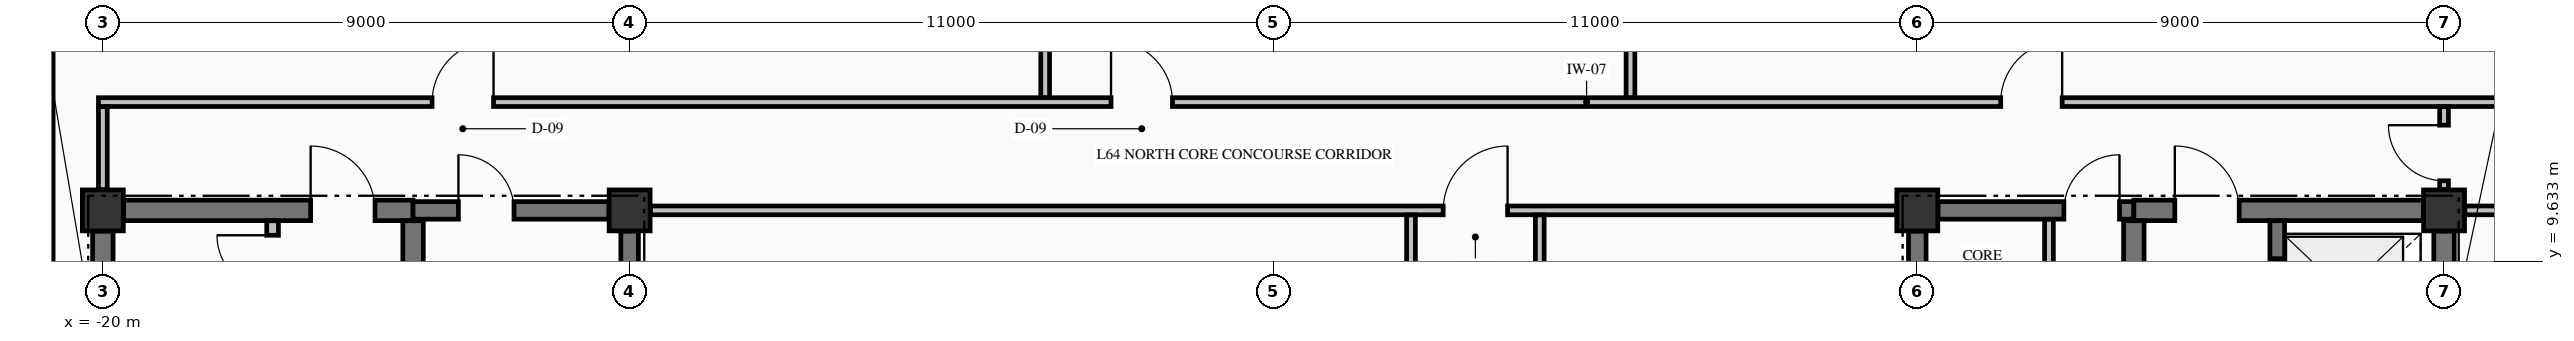
"""IFC4 building model, lengths in metres.
Left out: names, types, materials, properties, quantities, classifications, styles, units other than length and angle.
Written with IfcOpenShell. Run it as: python <this file> out.ifc"""

import sys

from ifc_helpers import new_model, si_unit, direction, frame, frame_2d, origin, origin_2d, place, context, subcontext, project, spatial, rectangle, extrude, element, fill, save


model = new_model("IFC4")
c1 = context("Model", 3, precision=1e-05, world=origin(), true_north=direction((0.0, 1.0)))
c2 = subcontext(c1, "Body", "Model", "MODEL_VIEW")
j1 = project(units=[si_unit("LENGTHUNIT", "METRE"), si_unit("PLANEANGLEUNIT", "RADIAN")], contexts=[c1])
p1 = place(None, origin())
s1 = spatial("IfcSite", under=j1, at=p1, CompositionType="ELEMENT")
p2 = place(p1, origin())
s2 = spatial("IfcBuilding", under=s1, at=p2, CompositionType="ELEMENT")
p3 = place(p2, frame((0.0, 0.0, 242.97)))
s3 = spatial("IfcBuildingStorey", under=s2, at=p3, CompositionType="ELEMENT", Elevation=242.97)
for number, where, z_axis, x_axis in (
    (1, (-20.0, 10.5, -0.25), (0.0, 0.0, 1.0), (1.0, 0.0, 0.0)),
    (2, (-11.0, 10.5, -0.25), (0.0, 0.0, 1.0), (1.0, 0.0, 0.0)),
    (3, (11.0, 10.5, -0.25), (0.0, 0.0, 1.0), (1.0, 0.0, 0.0)),
    (4, (20.0, 10.5, -0.25), (0.0, 0.0, 1.0), (1.0, 0.0, 0.0)),
):
    element("IfcColumn", number, at=place(p3, frame(where, z_axis=z_axis, x_axis=x_axis)), inside=s3, PredefinedType="COLUMN", context=c2, shape_type="SweptSolid", body=[
        extrude(rectangle(XDim=0.7, YDim=0.7, at=origin_2d()), origin(), (0.0, 0.0, 1.0), 3.23),
    ])
p4 = place(p3, frame((-21.0, 17.545, 0.0), z_axis=(0.0, 0.0, 1.0), x_axis=(0.0, -1.0, 0.0)))
e5 = element("IfcWall", 5, at=p4, inside=s3, PredefinedType="STANDARD", context=c2, shape_type="SweptSolid", body=[
    extrude(rectangle(XDim=8.09, YDim=0.3, at=frame_2d((4.045, 0.0))), origin(), (0.0, 0.0, 1.0), 2.372),
])
p5 = place(p3, frame((-19.646, 10.5, 0.0), z_axis=(0.0, 0.0, 1.0), x_axis=(1.0, 0.0, 0.0)))
e6 = element("IfcWall", 6, at=p5, inside=s3, PredefinedType="SHEAR", context=c2, shape_type="SweptSolid", body=[
    extrude(rectangle(XDim=4.946, YDim=0.35, at=frame_2d((2.473, 0.0))), origin(), (0.0, 0.0, 1.0), 2.98),
])
p6 = place(p5, frame((3.196, 0.0, 0.0)))
e7 = element("IfcOpeningElement", 7, at=p6, cuts=e6, PredefinedType="OPENING", context=c2, shape_type="SweptSolid", body=[
    extrude(rectangle(XDim=1.1, YDim=2.15, at=frame_2d((0.55, 1.075))), frame((0.0, 0.185, 0.0), z_axis=(0.0, -1.0, 0.0), x_axis=(1.0, 0.0, 0.0)), (0.0, 0.0, 1.0), 0.37),
])
p7 = place(p3, frame((-14.7, 10.5, 0.0), z_axis=(0.0, 0.0, 1.0), x_axis=(1.0, 0.0, 0.0)))
e8 = element("IfcWall", 8, at=p7, inside=s3, PredefinedType="SHEAR", context=c2, shape_type="SweptSolid", body=[
    extrude(rectangle(XDim=3.346, YDim=0.3, at=frame_2d((1.673, 0.0))), origin(), (0.0, 0.0, 1.0), 2.98),
])
p8 = place(p7, frame((0.775, 0.0, 0.0)))
e9 = element("IfcOpeningElement", 9, at=p8, cuts=e8, PredefinedType="OPENING", context=c2, shape_type="SweptSolid", body=[
    extrude(rectangle(XDim=0.95, YDim=2.15, at=frame_2d((0.475, 1.075))), frame((0.0, 0.16, 0.0), z_axis=(0.0, -1.0, 0.0), x_axis=(1.0, 0.0, 0.0)), (0.0, 0.0, 1.0), 0.32),
])
p9 = place(p3, frame((11.354, 10.5, 0.0), z_axis=(0.0, 0.0, 1.0), x_axis=(1.0, 0.0, 0.0)))
e10 = element("IfcWall", 10, at=p9, inside=s3, PredefinedType="SHEAR", context=c2, shape_type="SweptSolid", body=[
    extrude(rectangle(XDim=3.346, YDim=0.3, at=frame_2d((1.673, 0.0))), origin(), (0.0, 0.0, 1.0), 2.98),
])
p10 = place(p9, frame((2.151, 0.0, 0.0)))
e11 = element("IfcOpeningElement", 11, at=p10, cuts=e10, PredefinedType="OPENING", context=c2, shape_type="SweptSolid", body=[
    extrude(rectangle(XDim=0.95, YDim=2.15, at=frame_2d((0.475, 1.075))), frame((0.0, 0.16, 0.0), z_axis=(0.0, -1.0, 0.0), x_axis=(1.0, 0.0, 0.0)), (0.0, 0.0, 1.0), 0.32),
])
p11 = place(p3, frame((14.7, 10.5, 0.0), z_axis=(0.0, 0.0, 1.0), x_axis=(1.0, 0.0, 0.0)))
e12 = element("IfcWall", 12, at=p11, inside=s3, PredefinedType="SHEAR", context=c2, shape_type="SweptSolid", body=[
    extrude(rectangle(XDim=4.946, YDim=0.35, at=frame_2d((2.473, 0.0))), origin(), (0.0, 0.0, 1.0), 2.98),
])
p12 = place(p11, frame((0.7, 0.0, 0.0)))
e13 = element("IfcOpeningElement", 13, at=p12, cuts=e12, PredefinedType="OPENING", context=c2, shape_type="SweptSolid", body=[
    extrude(rectangle(XDim=1.1, YDim=2.15, at=frame_2d((0.55, 1.075))), frame((0.0, 0.185, 0.0), z_axis=(0.0, -1.0, 0.0), x_axis=(1.0, 0.0, 0.0)), (0.0, 0.0, 1.0), 0.37),
])
p13 = place(p3, frame((-10.644, 10.5, 0.0), z_axis=(0.0, 0.0, 1.0), x_axis=(1.0, 0.0, 0.0)))
e14 = element("IfcWall", 14, at=p13, inside=s3, PredefinedType="PARTITIONING", context=c2, shape_type="SweptSolid", body=[
    extrude(rectangle(XDim=21.288, YDim=0.15, at=frame_2d((10.644, 0.0))), origin(), (0.0, 0.0, 1.0), 2.98),
])
p14 = place(p13, frame((13.544, 0.0, 0.0)))
e15 = element("IfcOpeningElement", 15, at=p14, cuts=e14, PredefinedType="OPENING", context=c2, shape_type="SweptSolid", body=[
    extrude(rectangle(XDim=1.1, YDim=2.15, at=frame_2d((0.55, 1.075))), frame((0.0, 0.085, 0.0), z_axis=(0.0, -1.0, 0.0), x_axis=(1.0, 0.0, 0.0)), (0.0, 0.0, 1.0), 0.17),
])
p15 = place(p3, frame((20.356, 10.5, 0.0), z_axis=(0.0, 0.0, 1.0), x_axis=(1.0, 0.0, 0.0)))
e16 = element("IfcWall", 16, at=p15, inside=s3, PredefinedType="PARTITIONING", context=c2, shape_type="SweptSolid", body=[
    extrude(rectangle(XDim=5.479, YDim=0.15, at=frame_2d((2.74, 0.0))), origin(), (0.0, 0.0, 1.0), 2.98),
])
p16 = place(p15, frame((2.144, 0.0, 0.0)))
e17 = element("IfcOpeningElement", 17, at=p16, cuts=e16, PredefinedType="OPENING", context=c2, shape_type="SweptSolid", body=[
    extrude(rectangle(XDim=1.0, YDim=2.15, at=frame_2d((0.5, 1.075))), frame((0.0, 0.085, 0.0), z_axis=(0.0, -1.0, 0.0), x_axis=(1.0, 0.0, 0.0)), (0.0, 0.0, 1.0), 0.17),
])
p17 = place(p3, frame((-20.075, 12.35, 0.0), z_axis=(0.0, 0.0, 1.0), x_axis=(1.0, 0.0, 0.0)))
e18 = element("IfcWall", 18, at=p17, inside=s3, PredefinedType="PARTITIONING", context=c2, shape_type="SweptSolid", body=[
    extrude(rectangle(XDim=45.91, YDim=0.15, at=frame_2d((22.955, 0.0))), origin(), (0.0, 0.0, 1.0), 2.98),
])
p18 = place(p17, frame((5.7, 0.0, 0.0)))
e19 = element("IfcOpeningElement", 19, at=p18, cuts=e18, PredefinedType="OPENING", context=c2, shape_type="SweptSolid", body=[
    extrude(rectangle(XDim=1.05, YDim=2.15, at=frame_2d((0.525, 1.075))), frame((0.0, 0.085, 0.0), z_axis=(0.0, -1.0, 0.0), x_axis=(1.0, 0.0, 0.0)), (0.0, 0.0, 1.0), 0.17),
])
p19 = place(p17, frame((17.3, 0.0, 0.0)))
e20 = element("IfcOpeningElement", 20, at=p19, cuts=e18, PredefinedType="OPENING", context=c2, shape_type="SweptSolid", body=[
    extrude(rectangle(XDim=1.05, YDim=2.15, at=frame_2d((0.525, 1.075))), frame((0.0, 0.085, 0.0), z_axis=(0.0, -1.0, 0.0), x_axis=(1.0, 0.0, 0.0)), (0.0, 0.0, 1.0), 0.17),
])
p20 = place(p17, frame((32.5, 0.0, 0.0)))
e21 = element("IfcOpeningElement", 21, at=p20, cuts=e18, PredefinedType="OPENING", context=c2, shape_type="SweptSolid", body=[
    extrude(rectangle(XDim=1.05, YDim=2.15, at=frame_2d((0.525, 1.075))), frame((0.0, 0.085, 0.0), z_axis=(0.0, -1.0, 0.0), x_axis=(1.0, 0.0, 0.0)), (0.0, 0.0, 1.0), 0.17),
])
p21 = place(p3, frame((-20.0, 5.327, 0.0), z_axis=(0.0, 0.0, 1.0), x_axis=(0.0, 1.0, 0.0)))
e22 = element("IfcWall", 22, at=p21, inside=s3, PredefinedType="SHEAR", context=c2, shape_type="SweptSolid", body=[
    extrude(rectangle(XDim=4.819, YDim=0.35, at=frame_2d((2.41, 0.0))), origin(), (0.0, 0.0, 1.0), 2.98),
])
p22 = place(p3, frame((-14.7, 5.852, 0.0), z_axis=(0.0, 0.0, 1.0), x_axis=(0.0, 1.0, 0.0)))
e23 = element("IfcWall", 23, at=p22, inside=s3, PredefinedType="SHEAR", context=c2, shape_type="SweptSolid", body=[
    extrude(rectangle(XDim=4.471, YDim=0.35, at=frame_2d((2.235, 0.0))), origin(), (0.0, 0.0, 1.0), 2.98),
])
for number, where, z_axis, x_axis in (
    (24, (-11.0, 5.852, 0.0), (0.0, 0.0, 1.0), (0.0, 1.0, 0.0)),
    (25, (11.0, 5.852, 0.0), (0.0, 0.0, 1.0), (0.0, 1.0, 0.0)),
):
    element("IfcWall", number, at=place(p3, frame(where, z_axis=z_axis, x_axis=x_axis)), inside=s3, PredefinedType="SHEAR", context=c2, shape_type="SweptSolid", body=[
        extrude(rectangle(XDim=4.294, YDim=0.3, at=frame_2d((2.147, 0.0))), origin(), (0.0, 0.0, 1.0), 2.98),
    ])
p23 = place(p3, frame((14.7, 5.852, 0.0), z_axis=(0.0, 0.0, 1.0), x_axis=(0.0, 1.0, 0.0)))
e26 = element("IfcWall", 26, at=p23, inside=s3, PredefinedType="SHEAR", context=c2, shape_type="SweptSolid", body=[
    extrude(rectangle(XDim=4.471, YDim=0.35, at=frame_2d((2.235, 0.0))), origin(), (0.0, 0.0, 1.0), 2.98),
])
p24 = place(p3, frame((17.15, 7.877, 0.0), z_axis=(0.0, 0.0, 1.0), x_axis=(0.0, 1.0, 0.0)))
e27 = element("IfcWall", 27, at=p24, inside=s3, PredefinedType="SOLIDWALL", context=c2, shape_type="SweptSolid", body=[
    extrude(rectangle(XDim=2.446, YDim=0.25, at=frame_2d((1.223, 0.0))), origin(), (0.0, 0.0, 1.0), 2.98),
])
p25 = place(p24, frame((0.698, 0.0, 0.0)))
e28 = element("IfcOpeningElement", 28, at=p25, cuts=e27, PredefinedType="OPENING", context=c2, shape_type="SweptSolid", body=[
    extrude(rectangle(XDim=1.1, YDim=2.2, at=frame_2d((0.55, 1.1))), frame((0.0, 0.135, 0.0), z_axis=(0.0, -1.0, 0.0), x_axis=(1.0, 0.0, 0.0)), (0.0, 0.0, 1.0), 0.27),
])
p26 = place(p3, frame((20.0, 7.877, 0.0), z_axis=(0.0, 0.0, 1.0), x_axis=(0.0, 1.0, 0.0)))
e29 = element("IfcWall", 29, at=p26, inside=s3, PredefinedType="SHEAR", context=c2, shape_type="SweptSolid", body=[
    extrude(rectangle(XDim=2.269, YDim=0.35, at=frame_2d((1.135, 0.0))), origin(), (0.0, 0.0, 1.0), 2.98),
])
p27 = place(p3, frame((-20.0, 10.856, 0.0), z_axis=(0.0, 0.0, 1.0), x_axis=(0.0, 1.0, 0.0)))
e30 = element("IfcWall", 30, at=p27, inside=s3, PredefinedType="PARTITIONING", context=c2, shape_type="SweptSolid", body=[
    extrude(rectangle(XDim=1.416, YDim=0.15, at=frame_2d((0.708, 0.0))), origin(), (0.0, 0.0, 1.0), 2.57),
])
p28 = place(p3, frame((-17.1, 8.778, 0.0), z_axis=(0.0, 0.0, 1.0), x_axis=(0.0, 1.0, 0.0)))
e31 = element("IfcWall", 31, at=p28, inside=s3, PredefinedType="PARTITIONING", context=c2, shape_type="SweptSolid", body=[
    extrude(rectangle(XDim=1.544, YDim=0.2, at=frame_2d((0.772, 0.0))), origin(), (0.0, 0.0, 1.0), 2.98),
])
p29 = place(p28, frame((0.347, 0.0, 0.0)))
e32 = element("IfcOpeningElement", 32, at=p29, cuts=e31, PredefinedType="OPENING", context=c2, shape_type="SweptSolid", body=[
    extrude(rectangle(XDim=0.95, YDim=2.15, at=frame_2d((0.475, 1.075))), frame((0.0, 0.11, 0.0), z_axis=(0.0, -1.0, 0.0), x_axis=(1.0, 0.0, 0.0)), (0.0, 0.0, 1.0), 0.22),
])
p30 = place(p3, frame((-3.9, 12.428, 0.0), z_axis=(0.0, 0.0, 1.0), x_axis=(0.0, 1.0, 0.0)))
e33 = element("IfcWall", 33, at=p30, inside=s3, PredefinedType="PARTITIONING", context=c2, shape_type="SweptSolid", body=[
    extrude(rectangle(XDim=10.907, YDim=0.15, at=frame_2d((5.454, 0.0))), origin(), (0.0, 0.0, 1.0), 2.98),
])
for number, where, z_axis, x_axis in (
    (34, (2.35, 2.978, 0.0), (0.0, 0.0, 1.0), (0.0, 1.0, 0.0)),
    (35, (4.55, 2.978, 0.0), (0.0, 0.0, 1.0), (0.0, 1.0, 0.0)),
):
    element("IfcWall", number, at=place(p3, frame(where, z_axis=z_axis, x_axis=x_axis)), inside=s3, PredefinedType="PARTITIONING", context=c2, shape_type="SweptSolid", body=[
        extrude(rectangle(XDim=7.444, YDim=0.15, at=frame_2d((3.722, 0.0))), origin(), (0.0, 0.0, 1.0), 2.98),
    ])
p31 = place(p3, frame((6.1, 12.428, 0.0), z_axis=(0.0, 0.0, 1.0), x_axis=(0.0, 1.0, 0.0)))
e36 = element("IfcWall", 36, at=p31, inside=s3, PredefinedType="PARTITIONING", context=c2, shape_type="SweptSolid", body=[
    extrude(rectangle(XDim=10.907, YDim=0.15, at=frame_2d((5.454, 0.0))), origin(), (0.0, 0.0, 1.0), 2.98),
])
p32 = place(p3, frame((13.25, 5.853, 0.0), z_axis=(0.0, 0.0, 1.0), x_axis=(0.0, 1.0, 0.0)))
e37 = element("IfcWall", 37, at=p32, inside=s3, PredefinedType="PARTITIONING", context=c2, shape_type="SweptSolid", body=[
    extrude(rectangle(XDim=4.494, YDim=0.15, at=frame_2d((2.247, 0.0))), origin(), (0.0, 0.0, 1.0), 2.98),
])
p33 = place(p32, frame((1.472, 0.0, 0.0)))
e38 = element("IfcOpeningElement", 38, at=p33, cuts=e37, PredefinedType="OPENING", context=c2, shape_type="SweptSolid", body=[
    extrude(rectangle(XDim=0.95, YDim=2.15, at=frame_2d((0.475, 1.075))), frame((0.0, 0.085, 0.0), z_axis=(0.0, -1.0, 0.0), x_axis=(1.0, 0.0, 0.0)), (0.0, 0.0, 1.0), 0.17),
])
p34 = place(p3, frame((20.0, 10.856, 0.0), z_axis=(0.0, 0.0, 1.0), x_axis=(0.0, 1.0, 0.0)))
e39 = element("IfcWall", 39, at=p34, inside=s3, PredefinedType="PARTITIONING", context=c2, shape_type="SweptSolid", body=[
    extrude(rectangle(XDim=1.416, YDim=0.15, at=frame_2d((0.708, 0.0))), origin(), (0.0, 0.0, 1.0), 2.98),
])
p35 = place(p34, frame((0.15, 0.0, 0.0)))
e40 = element("IfcOpeningElement", 40, at=p35, cuts=e39, PredefinedType="OPENING", context=c2, shape_type="SweptSolid", body=[
    extrude(rectangle(XDim=0.95, YDim=2.15, at=frame_2d((0.475, 1.075))), frame((0.0, 0.085, 0.0), z_axis=(0.0, -1.0, 0.0), x_axis=(1.0, 0.0, 0.0)), (0.0, 0.0, 1.0), 0.17),
])
p36 = place(p8, origin())
e41 = element("IfcDoor", 41, at=p36, inside=s3, OperationType="SINGLE_SWING_LEFT", PredefinedType="DOOR", context=c2, shape_type="SweptSolid", body=[
    extrude(rectangle(XDim=0.95, YDim=2.15, at=frame_2d((0.475, 1.075))), frame((0.0, 0.025, 0.0), z_axis=(0.0, -1.0, 0.0), x_axis=(1.0, 0.0, 0.0)), (0.0, 0.0, 1.0), 0.05),
])
fill(e9, e41)
p37 = place(p10, origin())
e42 = element("IfcDoor", 42, at=p37, inside=s3, OperationType="SINGLE_SWING_RIGHT", PredefinedType="DOOR", context=c2, shape_type="SweptSolid", body=[
    extrude(rectangle(XDim=0.95, YDim=2.15, at=frame_2d((0.475, 1.075))), frame((0.0, 0.025, 0.0), z_axis=(0.0, -1.0, 0.0), x_axis=(1.0, 0.0, 0.0)), (0.0, 0.0, 1.0), 0.05),
])
fill(e11, e42)
p38 = place(p6, origin())
e43 = element("IfcDoor", 43, at=p38, inside=s3, OperationType="SINGLE_SWING_LEFT", PredefinedType="DOOR", context=c2, shape_type="SweptSolid", body=[
    extrude(rectangle(XDim=1.1, YDim=2.15, at=frame_2d((0.55, 1.075))), frame((0.0, 0.025, 0.0), z_axis=(0.0, -1.0, 0.0), x_axis=(1.0, 0.0, 0.0)), (0.0, 0.0, 1.0), 0.05),
])
fill(e7, e43)
p39 = place(p29, origin())
e44 = element("IfcDoor", 44, at=p39, inside=s3, OperationType="SINGLE_SWING_RIGHT", PredefinedType="DOOR", context=c2, shape_type="SweptSolid", body=[
    extrude(rectangle(XDim=0.95, YDim=2.15, at=frame_2d((0.475, 1.075))), frame((0.0, 0.025, 0.0), z_axis=(0.0, -1.0, 0.0), x_axis=(1.0, 0.0, 0.0)), (0.0, 0.0, 1.0), 0.05),
])
fill(e32, e44)
p40 = place(p25, origin())
e45 = element("IfcDoor", 45, at=p40, inside=s3, OperationType="SLIDING_TO_RIGHT", PredefinedType="DOOR", context=c2, shape_type="SweptSolid", body=[
    extrude(rectangle(XDim=1.1, YDim=2.2, at=frame_2d((0.55, 1.1))), frame((0.0, 0.025, 0.0), z_axis=(0.0, -1.0, 0.0), x_axis=(1.0, 0.0, 0.0)), (0.0, 0.0, 1.0), 0.05),
])
fill(e28, e45)
p41 = place(p12, origin())
e46 = element("IfcDoor", 46, at=p41, inside=s3, OperationType="SINGLE_SWING_LEFT", PredefinedType="DOOR", context=c2, shape_type="SweptSolid", body=[
    extrude(rectangle(XDim=1.1, YDim=2.15, at=frame_2d((0.55, 1.075))), frame((0.0, 0.025, 0.0), z_axis=(0.0, -1.0, 0.0), x_axis=(1.0, 0.0, 0.0)), (0.0, 0.0, 1.0), 0.05),
])
fill(e13, e46)
p42 = place(p14, origin())
e47 = element("IfcDoor", 47, at=p42, inside=s3, OperationType="SINGLE_SWING_RIGHT", PredefinedType="DOOR", context=c2, shape_type="SweptSolid", body=[
    extrude(rectangle(XDim=1.1, YDim=2.15, at=frame_2d((0.55, 1.075))), frame((0.0, 0.025, 0.0), z_axis=(0.0, -1.0, 0.0), x_axis=(1.0, 0.0, 0.0)), (0.0, 0.0, 1.0), 0.05),
])
fill(e15, e47)
p43 = place(p18, origin())
e48 = element("IfcDoor", 48, at=p43, inside=s3, OperationType="SINGLE_SWING_RIGHT", PredefinedType="DOOR", context=c2, shape_type="SweptSolid", body=[
    extrude(rectangle(XDim=1.05, YDim=2.15, at=frame_2d((0.525, 1.075))), frame((0.0, 0.025, 0.0), z_axis=(0.0, -1.0, 0.0), x_axis=(1.0, 0.0, 0.0)), (0.0, 0.0, 1.0), 0.05),
])
fill(e19, e48)
p44 = place(p19, origin())
e49 = element("IfcDoor", 49, at=p44, inside=s3, OperationType="SINGLE_SWING_LEFT", PredefinedType="DOOR", context=c2, shape_type="SweptSolid", body=[
    extrude(rectangle(XDim=1.05, YDim=2.15, at=frame_2d((0.525, 1.075))), frame((0.0, 0.025, 0.0), z_axis=(0.0, -1.0, 0.0), x_axis=(1.0, 0.0, 0.0)), (0.0, 0.0, 1.0), 0.05),
])
fill(e20, e49)
p45 = place(p20, origin())
e50 = element("IfcDoor", 50, at=p45, inside=s3, OperationType="SINGLE_SWING_RIGHT", PredefinedType="DOOR", context=c2, shape_type="SweptSolid", body=[
    extrude(rectangle(XDim=1.05, YDim=2.15, at=frame_2d((0.525, 1.075))), frame((0.0, 0.025, 0.0), z_axis=(0.0, -1.0, 0.0), x_axis=(1.0, 0.0, 0.0)), (0.0, 0.0, 1.0), 0.05),
])
fill(e21, e50)
p46 = place(p35, origin())
e51 = element("IfcDoor", 51, at=p46, inside=s3, OperationType="SINGLE_SWING_RIGHT", PredefinedType="DOOR", context=c2, shape_type="SweptSolid", body=[
    extrude(rectangle(XDim=0.95, YDim=2.15, at=frame_2d((0.475, 1.075))), frame((0.0, 0.025, 0.0), z_axis=(0.0, -1.0, 0.0), x_axis=(1.0, 0.0, 0.0)), (0.0, 0.0, 1.0), 0.05),
])
fill(e40, e51)
save(model, sys.argv[1])
